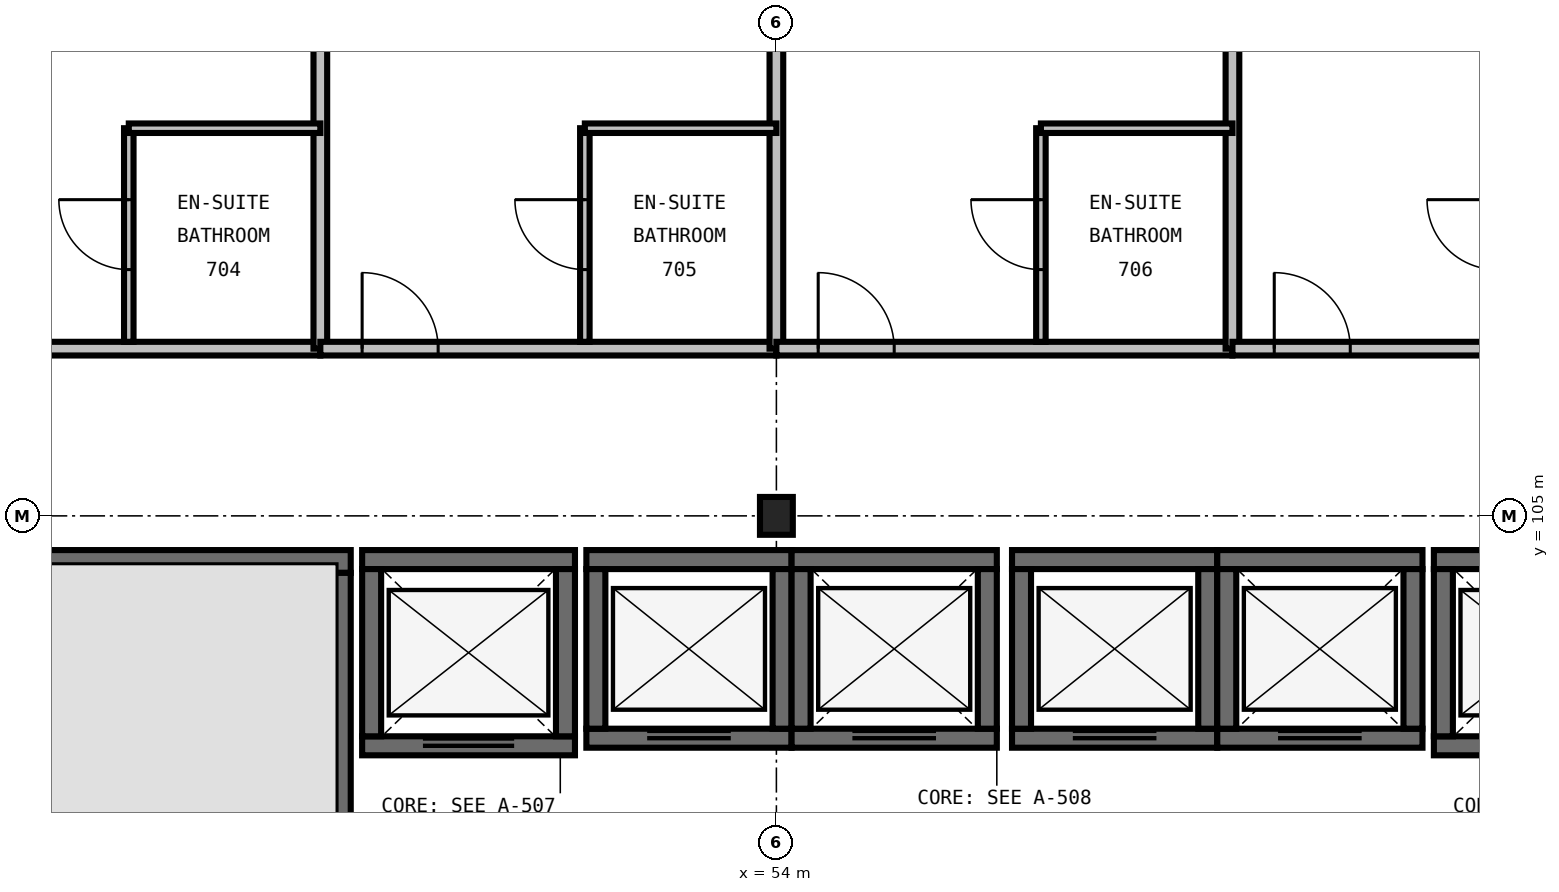
"""IFC4 building model, lengths in metres.
Left out: names, types, materials, properties, quantities, classifications, styles, units other than length and angle.
Written with IfcOpenShell. Run it as: python <this file> out.ifc"""

import sys

from ifc_helpers import new_model, si_unit, direction, frame, frame_2d, origin, origin_2d, place, context, subcontext, project, spatial, rectangle, i_section, extrude, element, fill, save


model = new_model("IFC4")
c1 = context("Model", 3, precision=1e-05, world=origin(), true_north=direction((0.0, 1.0)))
c2 = subcontext(c1, "Body", "Model", "MODEL_VIEW")
j1 = project(units=[si_unit("LENGTHUNIT", "METRE"), si_unit("PLANEANGLEUNIT", "RADIAN")], contexts=[c1])
p1 = place(None, origin())
s1 = spatial("IfcSite", under=j1, at=p1, CompositionType="ELEMENT")
p2 = place(p1, origin())
s2 = spatial("IfcBuilding", under=s1, at=p2, CompositionType="ELEMENT")
p3 = place(p2, frame((0.0, 0.0, 34.8)))
s3 = spatial("IfcBuildingStorey", under=s2, at=p3, CompositionType="ELEMENT", Elevation=34.8)
p4 = place(p3, frame((54.0, 105.0, 0.0), z_axis=(0.0, 0.0, 1.0), x_axis=(1.0, 0.0, 0.0)))
e1 = element("IfcColumn", 1, at=p4, inside=s3, PredefinedType="COLUMN", context=c2, shape_type="SweptSolid", body=[
    extrude(i_section(OverallWidth=0.432, OverallDepth=0.498, WebThickness=0.056, FlangeThickness=0.089, FilletRadius=0.031, at=origin_2d()), origin(), (0.0, 0.0, 1.0), 3.6),
])
p5 = place(p3, frame((48.4, 104.4, 0.0), z_axis=(0.0, 0.0, 1.0), x_axis=(-1.0, 0.0, 0.0)))
e2 = element("IfcWall", 2, at=p5, inside=s3, PredefinedType="SHEAR", context=c2, shape_type="SweptSolid", body=[
    extrude(rectangle(XDim=9.8, YDim=0.3, at=frame_2d((4.9, 0.0))), origin(), (0.0, 0.0, 1.0), 3.6),
])
p6 = place(p3, frame((48.25, 100.61, 0.0), z_axis=(0.0, 0.0, 1.0), x_axis=(0.0, 1.0, 0.0)))
e3 = element("IfcWall", 3, at=p6, inside=s3, PredefinedType="SHEAR", context=c2, shape_type="SweptSolid", body=[
    extrude(rectangle(XDim=3.64, YDim=0.3, at=frame_2d((1.82, 0.0))), origin(), (0.0, 0.0, 1.0), 3.6),
])
p7 = place(p3, frame((48.55, 101.975, 0.0), z_axis=(0.0, 0.0, 1.0), x_axis=(1.0, 0.0, 0.0)))
e4 = element("IfcWall", 4, at=p7, inside=s3, PredefinedType="SHEAR", context=c2, shape_type="SweptSolid", body=[
    extrude(rectangle(XDim=2.8, YDim=0.25, at=frame_2d((1.4, 0.0))), origin(), (0.0, 0.0, 1.0), 3.6),
])
p8 = place(p7, frame((0.8, 0.0, 0.0)))
e5 = element("IfcOpeningElement", 5, at=p8, cuts=e4, PredefinedType="OPENING", context=c2, shape_type="SweptSolid", body=[
    extrude(rectangle(XDim=1.2, YDim=2.2, at=frame_2d((0.6, 1.1))), frame((0.0, 0.14, 0.0), z_axis=(0.0, -1.0, 0.0), x_axis=(1.0, 0.0, 0.0)), (0.0, 0.0, 1.0), 0.28),
])
p9 = place(p3, frame((51.35, 104.425, 0.0), z_axis=(0.0, 0.0, 1.0), x_axis=(-1.0, 0.0, 0.0)))
e6 = element("IfcWall", 6, at=p9, inside=s3, PredefinedType="SHEAR", context=c2, shape_type="SweptSolid", body=[
    extrude(rectangle(XDim=2.8, YDim=0.25, at=frame_2d((1.4, 0.0))), origin(), (0.0, 0.0, 1.0), 3.6),
])
for number, where, z_axis, x_axis in (
    (7, (48.675, 104.3, 0.0), (0.0, 0.0, 1.0), (0.0, -1.0, 0.0)),
    (8, (51.225, 102.1, 0.0), (0.0, 0.0, 1.0), (0.0, 1.0, 0.0)),
):
    element("IfcWall", number, at=place(p3, frame(where, z_axis=z_axis, x_axis=x_axis)), inside=s3, PredefinedType="SHEAR", context=c2, shape_type="SweptSolid", body=[
        extrude(rectangle(XDim=2.2, YDim=0.25, at=frame_2d((1.1, 0.0))), origin(), (0.0, 0.0, 1.0), 3.6),
    ])
p10 = place(p3, frame((62.65, 101.975, 0.0), z_axis=(0.0, 0.0, 1.0), x_axis=(1.0, 0.0, 0.0)))
e9 = element("IfcWall", 9, at=p10, inside=s3, PredefinedType="SHEAR", context=c2, shape_type="SweptSolid", body=[
    extrude(rectangle(XDim=2.8, YDim=0.25, at=frame_2d((1.4, 0.0))), origin(), (0.0, 0.0, 1.0), 3.6),
])
p11 = place(p10, frame((0.8, 0.0, 0.0)))
e10 = element("IfcOpeningElement", 10, at=p11, cuts=e9, PredefinedType="OPENING", context=c2, shape_type="SweptSolid", body=[
    extrude(rectangle(XDim=1.2, YDim=2.2, at=frame_2d((0.6, 1.1))), frame((0.0, 0.14, 0.0), z_axis=(0.0, -1.0, 0.0), x_axis=(1.0, 0.0, 0.0)), (0.0, 0.0, 1.0), 0.28),
])
p12 = place(p3, frame((65.45, 104.425, 0.0), z_axis=(0.0, 0.0, 1.0), x_axis=(-1.0, 0.0, 0.0)))
e11 = element("IfcWall", 11, at=p12, inside=s3, PredefinedType="SHEAR", context=c2, shape_type="SweptSolid", body=[
    extrude(rectangle(XDim=2.8, YDim=0.25, at=frame_2d((1.4, 0.0))), origin(), (0.0, 0.0, 1.0), 3.6),
])
p13 = place(p3, frame((62.775, 104.3, 0.0), z_axis=(0.0, 0.0, 1.0), x_axis=(0.0, -1.0, 0.0)))
e12 = element("IfcWall", 12, at=p13, inside=s3, PredefinedType="SHEAR", context=c2, shape_type="SweptSolid", body=[
    extrude(rectangle(XDim=2.2, YDim=0.25, at=frame_2d((1.1, 0.0))), origin(), (0.0, 0.0, 1.0), 3.6),
])
p14 = place(p3, frame((51.5, 102.075, 0.0), z_axis=(0.0, 0.0, 1.0), x_axis=(1.0, 0.0, 0.0)))
e13 = element("IfcWall", 13, at=p14, inside=s3, PredefinedType="SHEAR", context=c2, shape_type="SweptSolid", body=[
    extrude(rectangle(XDim=2.7, YDim=0.25, at=frame_2d((1.35, 0.0))), origin(), (0.0, 0.0, 1.0), 3.6),
])
p15 = place(p14, frame((0.8, 0.0, 0.0)))
e14 = element("IfcOpeningElement", 14, at=p15, cuts=e13, PredefinedType="OPENING", context=c2, shape_type="SweptSolid", body=[
    extrude(rectangle(XDim=1.1, YDim=2.2, at=frame_2d((0.55, 1.1))), frame((0.0, 0.14, 0.0), z_axis=(0.0, -1.0, 0.0), x_axis=(1.0, 0.0, 0.0)), (0.0, 0.0, 1.0), 0.28),
])
p16 = place(p3, frame((54.2, 104.425, 0.0), z_axis=(0.0, 0.0, 1.0), x_axis=(-1.0, 0.0, 0.0)))
e15 = element("IfcWall", 15, at=p16, inside=s3, PredefinedType="SHEAR", context=c2, shape_type="SweptSolid", body=[
    extrude(rectangle(XDim=2.7, YDim=0.25, at=frame_2d((1.35, 0.0))), origin(), (0.0, 0.0, 1.0), 3.6),
])
for number, where, z_axis, x_axis in (
    (16, (51.625, 104.3, 0.0), (0.0, 0.0, 1.0), (0.0, -1.0, 0.0)),
    (17, (54.075, 102.2, 0.0), (0.0, 0.0, 1.0), (0.0, 1.0, 0.0)),
):
    element("IfcWall", number, at=place(p3, frame(where, z_axis=z_axis, x_axis=x_axis)), inside=s3, PredefinedType="SHEAR", context=c2, shape_type="SweptSolid", body=[
        extrude(rectangle(XDim=2.1, YDim=0.25, at=frame_2d((1.05, 0.0))), origin(), (0.0, 0.0, 1.0), 3.6),
    ])
p17 = place(p3, frame((54.2, 102.075, 0.0), z_axis=(0.0, 0.0, 1.0), x_axis=(1.0, 0.0, 0.0)))
e18 = element("IfcWall", 18, at=p17, inside=s3, PredefinedType="SHEAR", context=c2, shape_type="SweptSolid", body=[
    extrude(rectangle(XDim=2.7, YDim=0.25, at=frame_2d((1.35, 0.0))), origin(), (0.0, 0.0, 1.0), 3.6),
])
p18 = place(p17, frame((0.8, 0.0, 0.0)))
e19 = element("IfcOpeningElement", 19, at=p18, cuts=e18, PredefinedType="OPENING", context=c2, shape_type="SweptSolid", body=[
    extrude(rectangle(XDim=1.1, YDim=2.2, at=frame_2d((0.55, 1.1))), frame((0.0, 0.14, 0.0), z_axis=(0.0, -1.0, 0.0), x_axis=(1.0, 0.0, 0.0)), (0.0, 0.0, 1.0), 0.28),
])
p19 = place(p3, frame((56.9, 104.425, 0.0), z_axis=(0.0, 0.0, 1.0), x_axis=(-1.0, 0.0, 0.0)))
e20 = element("IfcWall", 20, at=p19, inside=s3, PredefinedType="SHEAR", context=c2, shape_type="SweptSolid", body=[
    extrude(rectangle(XDim=2.7, YDim=0.25, at=frame_2d((1.35, 0.0))), origin(), (0.0, 0.0, 1.0), 3.6),
])
for number, where, z_axis, x_axis in (
    (21, (54.325, 104.3, 0.0), (0.0, 0.0, 1.0), (0.0, -1.0, 0.0)),
    (22, (56.775, 102.2, 0.0), (0.0, 0.0, 1.0), (0.0, 1.0, 0.0)),
):
    element("IfcWall", number, at=place(p3, frame(where, z_axis=z_axis, x_axis=x_axis)), inside=s3, PredefinedType="SHEAR", context=c2, shape_type="SweptSolid", body=[
        extrude(rectangle(XDim=2.1, YDim=0.25, at=frame_2d((1.05, 0.0))), origin(), (0.0, 0.0, 1.0), 3.6),
    ])
p20 = place(p3, frame((57.1, 102.075, 0.0), z_axis=(0.0, 0.0, 1.0), x_axis=(1.0, 0.0, 0.0)))
e23 = element("IfcWall", 23, at=p20, inside=s3, PredefinedType="SHEAR", context=c2, shape_type="SweptSolid", body=[
    extrude(rectangle(XDim=2.7, YDim=0.25, at=frame_2d((1.35, 0.0))), origin(), (0.0, 0.0, 1.0), 3.6),
])
p21 = place(p20, frame((0.8, 0.0, 0.0)))
e24 = element("IfcOpeningElement", 24, at=p21, cuts=e23, PredefinedType="OPENING", context=c2, shape_type="SweptSolid", body=[
    extrude(rectangle(XDim=1.1, YDim=2.2, at=frame_2d((0.55, 1.1))), frame((0.0, 0.14, 0.0), z_axis=(0.0, -1.0, 0.0), x_axis=(1.0, 0.0, 0.0)), (0.0, 0.0, 1.0), 0.28),
])
p22 = place(p3, frame((59.8, 104.425, 0.0), z_axis=(0.0, 0.0, 1.0), x_axis=(-1.0, 0.0, 0.0)))
e25 = element("IfcWall", 25, at=p22, inside=s3, PredefinedType="SHEAR", context=c2, shape_type="SweptSolid", body=[
    extrude(rectangle(XDim=2.7, YDim=0.25, at=frame_2d((1.35, 0.0))), origin(), (0.0, 0.0, 1.0), 3.6),
])
for number, where, z_axis, x_axis in (
    (26, (57.225, 104.3, 0.0), (0.0, 0.0, 1.0), (0.0, -1.0, 0.0)),
    (27, (59.675, 102.2, 0.0), (0.0, 0.0, 1.0), (0.0, 1.0, 0.0)),
):
    element("IfcWall", number, at=place(p3, frame(where, z_axis=z_axis, x_axis=x_axis)), inside=s3, PredefinedType="SHEAR", context=c2, shape_type="SweptSolid", body=[
        extrude(rectangle(XDim=2.1, YDim=0.25, at=frame_2d((1.05, 0.0))), origin(), (0.0, 0.0, 1.0), 3.6),
    ])
p23 = place(p3, frame((59.8, 102.075, 0.0), z_axis=(0.0, 0.0, 1.0), x_axis=(1.0, 0.0, 0.0)))
e28 = element("IfcWall", 28, at=p23, inside=s3, PredefinedType="SHEAR", context=c2, shape_type="SweptSolid", body=[
    extrude(rectangle(XDim=2.7, YDim=0.25, at=frame_2d((1.35, 0.0))), origin(), (0.0, 0.0, 1.0), 3.6),
])
p24 = place(p23, frame((0.8, 0.0, 0.0)))
e29 = element("IfcOpeningElement", 29, at=p24, cuts=e28, PredefinedType="OPENING", context=c2, shape_type="SweptSolid", body=[
    extrude(rectangle(XDim=1.1, YDim=2.2, at=frame_2d((0.55, 1.1))), frame((0.0, 0.14, 0.0), z_axis=(0.0, -1.0, 0.0), x_axis=(1.0, 0.0, 0.0)), (0.0, 0.0, 1.0), 0.28),
])
p25 = place(p3, frame((62.5, 104.425, 0.0), z_axis=(0.0, 0.0, 1.0), x_axis=(-1.0, 0.0, 0.0)))
e30 = element("IfcWall", 30, at=p25, inside=s3, PredefinedType="SHEAR", context=c2, shape_type="SweptSolid", body=[
    extrude(rectangle(XDim=2.7, YDim=0.25, at=frame_2d((1.35, 0.0))), origin(), (0.0, 0.0, 1.0), 3.6),
])
for number, where, z_axis, x_axis in (
    (31, (59.925, 104.3, 0.0), (0.0, 0.0, 1.0), (0.0, -1.0, 0.0)),
    (32, (62.375, 102.2, 0.0), (0.0, 0.0, 1.0), (0.0, 1.0, 0.0)),
):
    element("IfcWall", number, at=place(p3, frame(where, z_axis=z_axis, x_axis=x_axis)), inside=s3, PredefinedType="SHEAR", context=c2, shape_type="SweptSolid", body=[
        extrude(rectangle(XDim=2.1, YDim=0.25, at=frame_2d((1.05, 0.0))), origin(), (0.0, 0.0, 1.0), 3.6),
    ])
p26 = place(p3, frame((42.0, 107.2, 0.0), z_axis=(0.0, 0.0, 1.0), x_axis=(1.0, 0.0, 0.0)))
e33 = element("IfcWall", 33, at=p26, inside=s3, PredefinedType="PARTITIONING", context=c2, shape_type="SweptSolid", body=[
    extrude(rectangle(XDim=6.0, YDim=0.18, at=frame_2d((3.0, 0.0))), origin(), (0.0, 0.0, 1.0), 3.29),
])
p27 = place(p26, frame((0.55, 0.0, 0.0)))
e34 = element("IfcOpeningElement", 34, at=p27, cuts=e33, PredefinedType="OPENING", context=c2, shape_type="SweptSolid", body=[
    extrude(rectangle(XDim=1.0, YDim=2.15, at=frame_2d((0.5, 1.075))), frame((0.0, 0.105, 0.0), z_axis=(0.0, -1.0, 0.0), x_axis=(1.0, 0.0, 0.0)), (0.0, 0.0, 1.0), 0.21),
])
p28 = place(p3, frame((48.0, 107.2, 0.0), z_axis=(0.0, 0.0, 1.0), x_axis=(0.0, 1.0, 0.0)))
e35 = element("IfcWall", 35, at=p28, inside=s3, PredefinedType="PARTITIONING", context=c2, shape_type="SweptSolid", body=[
    extrude(rectangle(XDim=9.625, YDim=0.18, at=frame_2d((4.812, 0.0))), origin(), (0.0, 0.0, 1.0), 3.29),
])
p29 = place(p3, frame((45.48, 107.29, 0.0), z_axis=(0.0, 0.0, 1.0), x_axis=(0.0, 1.0, 0.0)))
e36 = element("IfcWall", 36, at=p29, inside=s3, PredefinedType="PARTITIONING", context=c2, shape_type="SweptSolid", body=[
    extrude(rectangle(XDim=2.81, YDim=0.125, at=frame_2d((1.405, 0.0))), origin(), (0.0, 0.0, 1.0), 3.29),
])
p30 = place(p29, frame((0.95, 0.0, 0.0)))
e37 = element("IfcOpeningElement", 37, at=p30, cuts=e36, PredefinedType="OPENING", context=c2, shape_type="SweptSolid", body=[
    extrude(rectangle(XDim=0.92, YDim=2.1, at=frame_2d((0.46, 1.05))), frame((0.0, 0.077, 0.0), z_axis=(0.0, -1.0, 0.0), x_axis=(1.0, 0.0, 0.0)), (0.0, 0.0, 1.0), 0.155),
])
p31 = place(p3, frame((45.48, 110.1, 0.0), z_axis=(0.0, 0.0, 1.0), x_axis=(1.0, 0.0, 0.0)))
e38 = element("IfcWall", 38, at=p31, inside=s3, PredefinedType="PARTITIONING", context=c2, shape_type="SweptSolid", body=[
    extrude(rectangle(XDim=2.52, YDim=0.125, at=frame_2d((1.26, 0.0))), origin(), (0.0, 0.0, 1.0), 3.29),
])
p32 = place(p3, frame((48.0, 107.2, 0.0), z_axis=(0.0, 0.0, 1.0), x_axis=(1.0, 0.0, 0.0)))
e39 = element("IfcWall", 39, at=p32, inside=s3, PredefinedType="PARTITIONING", context=c2, shape_type="SweptSolid", body=[
    extrude(rectangle(XDim=6.0, YDim=0.18, at=frame_2d((3.0, 0.0))), origin(), (0.0, 0.0, 1.0), 3.29),
])
p33 = place(p32, frame((0.55, 0.0, 0.0)))
e40 = element("IfcOpeningElement", 40, at=p33, cuts=e39, PredefinedType="OPENING", context=c2, shape_type="SweptSolid", body=[
    extrude(rectangle(XDim=1.0, YDim=2.15, at=frame_2d((0.5, 1.075))), frame((0.0, 0.105, 0.0), z_axis=(0.0, -1.0, 0.0), x_axis=(1.0, 0.0, 0.0)), (0.0, 0.0, 1.0), 0.21),
])
p34 = place(p3, frame((54.0, 107.2, 0.0), z_axis=(0.0, 0.0, 1.0), x_axis=(0.0, 1.0, 0.0)))
e41 = element("IfcWall", 41, at=p34, inside=s3, PredefinedType="PARTITIONING", context=c2, shape_type="SweptSolid", body=[
    extrude(rectangle(XDim=9.625, YDim=0.18, at=frame_2d((4.812, 0.0))), origin(), (0.0, 0.0, 1.0), 2.59),
])
p35 = place(p3, frame((51.48, 107.29, 0.0), z_axis=(0.0, 0.0, 1.0), x_axis=(0.0, 1.0, 0.0)))
e42 = element("IfcWall", 42, at=p35, inside=s3, PredefinedType="PARTITIONING", context=c2, shape_type="SweptSolid", body=[
    extrude(rectangle(XDim=2.81, YDim=0.125, at=frame_2d((1.405, 0.0))), origin(), (0.0, 0.0, 1.0), 3.29),
])
p36 = place(p35, frame((0.95, 0.0, 0.0)))
e43 = element("IfcOpeningElement", 43, at=p36, cuts=e42, PredefinedType="OPENING", context=c2, shape_type="SweptSolid", body=[
    extrude(rectangle(XDim=0.92, YDim=2.1, at=frame_2d((0.46, 1.05))), frame((0.0, 0.077, 0.0), z_axis=(0.0, -1.0, 0.0), x_axis=(1.0, 0.0, 0.0)), (0.0, 0.0, 1.0), 0.155),
])
p37 = place(p3, frame((51.48, 110.1, 0.0), z_axis=(0.0, 0.0, 1.0), x_axis=(1.0, 0.0, 0.0)))
e44 = element("IfcWall", 44, at=p37, inside=s3, PredefinedType="PARTITIONING", context=c2, shape_type="SweptSolid", body=[
    extrude(rectangle(XDim=2.52, YDim=0.125, at=frame_2d((1.26, 0.0))), origin(), (0.0, 0.0, 1.0), 3.29),
])
p38 = place(p3, frame((54.0, 107.2, 0.0), z_axis=(0.0, 0.0, 1.0), x_axis=(1.0, 0.0, 0.0)))
e45 = element("IfcWall", 45, at=p38, inside=s3, PredefinedType="PARTITIONING", context=c2, shape_type="SweptSolid", body=[
    extrude(rectangle(XDim=6.0, YDim=0.18, at=frame_2d((3.0, 0.0))), origin(), (0.0, 0.0, 1.0), 3.29),
])
p39 = place(p38, frame((0.55, 0.0, 0.0)))
e46 = element("IfcOpeningElement", 46, at=p39, cuts=e45, PredefinedType="OPENING", context=c2, shape_type="SweptSolid", body=[
    extrude(rectangle(XDim=1.0, YDim=2.15, at=frame_2d((0.5, 1.075))), frame((0.0, 0.105, 0.0), z_axis=(0.0, -1.0, 0.0), x_axis=(1.0, 0.0, 0.0)), (0.0, 0.0, 1.0), 0.21),
])
p40 = place(p3, frame((60.0, 107.2, 0.0), z_axis=(0.0, 0.0, 1.0), x_axis=(0.0, 1.0, 0.0)))
e47 = element("IfcWall", 47, at=p40, inside=s3, PredefinedType="PARTITIONING", context=c2, shape_type="SweptSolid", body=[
    extrude(rectangle(XDim=9.625, YDim=0.18, at=frame_2d((4.812, 0.0))), origin(), (0.0, 0.0, 1.0), 3.29),
])
p41 = place(p3, frame((57.48, 107.29, 0.0), z_axis=(0.0, 0.0, 1.0), x_axis=(0.0, 1.0, 0.0)))
e48 = element("IfcWall", 48, at=p41, inside=s3, PredefinedType="PARTITIONING", context=c2, shape_type="SweptSolid", body=[
    extrude(rectangle(XDim=2.81, YDim=0.125, at=frame_2d((1.405, 0.0))), origin(), (0.0, 0.0, 1.0), 3.29),
])
p42 = place(p41, frame((0.95, 0.0, 0.0)))
e49 = element("IfcOpeningElement", 49, at=p42, cuts=e48, PredefinedType="OPENING", context=c2, shape_type="SweptSolid", body=[
    extrude(rectangle(XDim=0.92, YDim=2.1, at=frame_2d((0.46, 1.05))), frame((0.0, 0.077, 0.0), z_axis=(0.0, -1.0, 0.0), x_axis=(1.0, 0.0, 0.0)), (0.0, 0.0, 1.0), 0.155),
])
p43 = place(p3, frame((57.48, 110.1, 0.0), z_axis=(0.0, 0.0, 1.0), x_axis=(1.0, 0.0, 0.0)))
e50 = element("IfcWall", 50, at=p43, inside=s3, PredefinedType="PARTITIONING", context=c2, shape_type="SweptSolid", body=[
    extrude(rectangle(XDim=2.52, YDim=0.125, at=frame_2d((1.26, 0.0))), origin(), (0.0, 0.0, 1.0), 3.29),
])
p44 = place(p3, frame((60.0, 107.2, 0.0), z_axis=(0.0, 0.0, 1.0), x_axis=(1.0, 0.0, 0.0)))
e51 = element("IfcWall", 51, at=p44, inside=s3, PredefinedType="PARTITIONING", context=c2, shape_type="SweptSolid", body=[
    extrude(rectangle(XDim=6.0, YDim=0.18, at=frame_2d((3.0, 0.0))), origin(), (0.0, 0.0, 1.0), 3.29),
])
p45 = place(p44, frame((0.55, 0.0, 0.0)))
e52 = element("IfcOpeningElement", 52, at=p45, cuts=e51, PredefinedType="OPENING", context=c2, shape_type="SweptSolid", body=[
    extrude(rectangle(XDim=1.0, YDim=2.15, at=frame_2d((0.5, 1.075))), frame((0.0, 0.105, 0.0), z_axis=(0.0, -1.0, 0.0), x_axis=(1.0, 0.0, 0.0)), (0.0, 0.0, 1.0), 0.21),
])
p46 = place(p8, origin())
e53 = element("IfcDoor", 53, at=p46, inside=s3, OperationType="DOUBLE_DOOR_SLIDING", PredefinedType="DOOR", context=c2, shape_type="SweptSolid", body=[
    extrude(rectangle(XDim=1.2, YDim=2.2, at=frame_2d((0.6, 1.1))), frame((0.0, 0.025, 0.0), z_axis=(0.0, -1.0, 0.0), x_axis=(1.0, 0.0, 0.0)), (0.0, 0.0, 1.0), 0.05),
])
fill(e5, e53)
p47 = place(p15, origin())
e54 = element("IfcDoor", 54, at=p47, inside=s3, OperationType="DOUBLE_DOOR_SLIDING", PredefinedType="DOOR", context=c2, shape_type="SweptSolid", body=[
    extrude(rectangle(XDim=1.1, YDim=2.2, at=frame_2d((0.55, 1.1))), frame((0.0, 0.025, 0.0), z_axis=(0.0, -1.0, 0.0), x_axis=(1.0, 0.0, 0.0)), (0.0, 0.0, 1.0), 0.05),
])
fill(e14, e54)
p48 = place(p18, origin())
e55 = element("IfcDoor", 55, at=p48, inside=s3, OperationType="DOUBLE_DOOR_SLIDING", PredefinedType="DOOR", context=c2, shape_type="SweptSolid", body=[
    extrude(rectangle(XDim=1.1, YDim=2.2, at=frame_2d((0.55, 1.1))), frame((0.0, 0.025, 0.0), z_axis=(0.0, -1.0, 0.0), x_axis=(1.0, 0.0, 0.0)), (0.0, 0.0, 1.0), 0.05),
])
fill(e19, e55)
p49 = place(p21, origin())
e56 = element("IfcDoor", 56, at=p49, inside=s3, OperationType="DOUBLE_DOOR_SLIDING", PredefinedType="DOOR", context=c2, shape_type="SweptSolid", body=[
    extrude(rectangle(XDim=1.1, YDim=2.2, at=frame_2d((0.55, 1.1))), frame((0.0, 0.025, 0.0), z_axis=(0.0, -1.0, 0.0), x_axis=(1.0, 0.0, 0.0)), (0.0, 0.0, 1.0), 0.05),
])
fill(e24, e56)
p50 = place(p24, origin())
e57 = element("IfcDoor", 57, at=p50, inside=s3, OperationType="DOUBLE_DOOR_SLIDING", PredefinedType="DOOR", context=c2, shape_type="SweptSolid", body=[
    extrude(rectangle(XDim=1.1, YDim=2.2, at=frame_2d((0.55, 1.1))), frame((0.0, 0.025, 0.0), z_axis=(0.0, -1.0, 0.0), x_axis=(1.0, 0.0, 0.0)), (0.0, 0.0, 1.0), 0.05),
])
fill(e29, e57)
p51 = place(p30, origin())
e58 = element("IfcDoor", 58, at=p51, inside=s3, OperationType="SINGLE_SWING_RIGHT", PredefinedType="DOOR", context=c2, shape_type="SweptSolid", body=[
    extrude(rectangle(XDim=0.92, YDim=2.1, at=frame_2d((0.46, 1.05))), frame((0.0, 0.025, 0.0), z_axis=(0.0, -1.0, 0.0), x_axis=(1.0, 0.0, 0.0)), (0.0, 0.0, 1.0), 0.05),
])
fill(e37, e58)
p52 = place(p33, origin())
e59 = element("IfcDoor", 59, at=p52, inside=s3, OperationType="SINGLE_SWING_LEFT", PredefinedType="DOOR", context=c2, shape_type="SweptSolid", body=[
    extrude(rectangle(XDim=1.0, YDim=2.15, at=frame_2d((0.5, 1.075))), frame((0.0, 0.025, 0.0), z_axis=(0.0, -1.0, 0.0), x_axis=(1.0, 0.0, 0.0)), (0.0, 0.0, 1.0), 0.05),
])
fill(e40, e59)
p53 = place(p36, origin())
e60 = element("IfcDoor", 60, at=p53, inside=s3, OperationType="SINGLE_SWING_RIGHT", PredefinedType="DOOR", context=c2, shape_type="SweptSolid", body=[
    extrude(rectangle(XDim=0.92, YDim=2.1, at=frame_2d((0.46, 1.05))), frame((0.0, 0.025, 0.0), z_axis=(0.0, -1.0, 0.0), x_axis=(1.0, 0.0, 0.0)), (0.0, 0.0, 1.0), 0.05),
])
fill(e43, e60)
p54 = place(p39, origin())
e61 = element("IfcDoor", 61, at=p54, inside=s3, OperationType="SINGLE_SWING_LEFT", PredefinedType="DOOR", context=c2, shape_type="SweptSolid", body=[
    extrude(rectangle(XDim=1.0, YDim=2.15, at=frame_2d((0.5, 1.075))), frame((0.0, 0.025, 0.0), z_axis=(0.0, -1.0, 0.0), x_axis=(1.0, 0.0, 0.0)), (0.0, 0.0, 1.0), 0.05),
])
fill(e46, e61)
p55 = place(p42, origin())
e62 = element("IfcDoor", 62, at=p55, inside=s3, OperationType="SINGLE_SWING_RIGHT", PredefinedType="DOOR", context=c2, shape_type="SweptSolid", body=[
    extrude(rectangle(XDim=0.92, YDim=2.1, at=frame_2d((0.46, 1.05))), frame((0.0, 0.025, 0.0), z_axis=(0.0, -1.0, 0.0), x_axis=(1.0, 0.0, 0.0)), (0.0, 0.0, 1.0), 0.05),
])
fill(e49, e62)
p56 = place(p45, origin())
e63 = element("IfcDoor", 63, at=p56, inside=s3, OperationType="SINGLE_SWING_LEFT", PredefinedType="DOOR", context=c2, shape_type="SweptSolid", body=[
    extrude(rectangle(XDim=1.0, YDim=2.15, at=frame_2d((0.5, 1.075))), frame((0.0, 0.025, 0.0), z_axis=(0.0, -1.0, 0.0), x_axis=(1.0, 0.0, 0.0)), (0.0, 0.0, 1.0), 0.05),
])
fill(e52, e63)
save(model, sys.argv[1])
